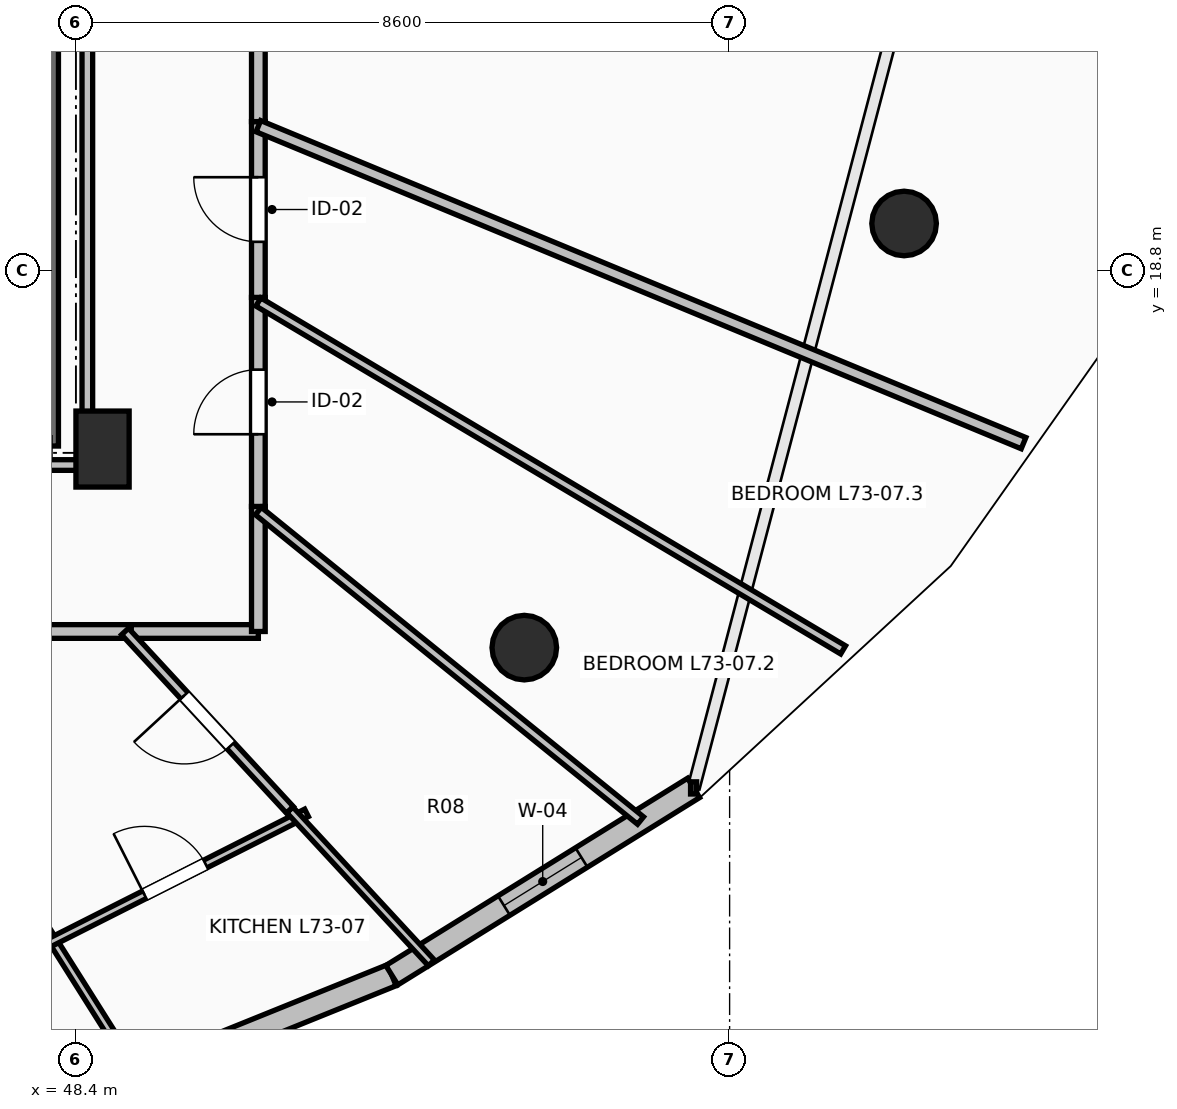
"""IFC4 building model, lengths in metres.
Left out: names, types, materials, properties, quantities, classifications, styles, units other than length and angle.
Written with IfcOpenShell. Run it as: python <this file> out.ifc"""

import sys

from ifc_helpers import new_model, si_unit, direction, frame, frame_2d, origin, origin_2d, place, context, subcontext, project, spatial, rectangle, circle, extrude, element, fill, save


model = new_model("IFC4")
c1 = context("Model", 3, precision=1e-05, world=origin(), true_north=direction((0.0, 1.0)))
c2 = subcontext(c1, "Body", "Model", "MODEL_VIEW")
j1 = project(units=[si_unit("LENGTHUNIT", "METRE"), si_unit("PLANEANGLEUNIT", "RADIAN")], contexts=[c1])
p1 = place(None, origin())
s1 = spatial("IfcSite", under=j1, at=p1, CompositionType="ELEMENT")
p2 = place(p1, origin())
s2 = spatial("IfcBuilding", under=s1, at=p2, CompositionType="ELEMENT")
p3 = place(p2, frame((0.0, 0.0, 269.75)))
s3 = spatial("IfcBuildingStorey", under=s2, at=p3, CompositionType="ELEMENT", Elevation=269.75)
for number, where, z_axis, x_axis in (
    (1, (54.299, 13.838, 0.0), (0.0, 0.0, 1.0), (0.707, -0.707, 0.0)),
    (2, (59.295, 19.418, 0.0), (0.0, 0.0, 1.0), (0.924, -0.383, 0.0)),
):
    element("IfcColumn", number, at=place(p3, frame(where, z_axis=z_axis, x_axis=x_axis)), inside=s3, PredefinedType="COLUMN", context=c2, shape_type="SweptSolid", body=[
        extrude(circle(Radius=0.425, at=origin_2d()), origin(), (0.0, 0.0, 1.0), 3.55),
    ])
p4 = place(p3, frame((48.75, 16.45, 0.0), z_axis=(0.0, 0.0, 1.0), x_axis=(1.0, 0.0, 0.0)))
e3 = element("IfcColumn", 3, at=p4, inside=s3, PredefinedType="PILASTER", context=c2, shape_type="SweptSolid", body=[
    extrude(rectangle(XDim=0.7, YDim=1.0, at=origin_2d()), origin(), (0.0, 0.0, 1.0), 3.55),
])
p5 = place(p3, frame((48.026, 7.698, 0.0), z_axis=(0.0, 0.0, 1.0), x_axis=(0.927147375511, 0.374696869594, 0.0)))
e4 = element("IfcWall", 4, at=p5, inside=s3, PredefinedType="STANDARD", context=c2, shape_type="SweptSolid", body=[
    extrude(rectangle(XDim=4.885, YDim=0.3, at=frame_2d((2.443, 0.0))), origin(), (0.0, 0.0, 1.0), 3.29),
])
p6 = place(p3, frame((52.556, 9.529, 0.0), z_axis=(0.0, 0.0, 1.0), x_axis=(0.849702323036, 0.527262707032, 0.0)))
e5 = element("IfcWall", 5, at=p6, inside=s3, PredefinedType="STANDARD", context=c2, shape_type="SweptSolid", body=[
    extrude(rectangle(XDim=4.672, YDim=0.3, at=frame_2d((2.336, 0.0))), origin(), (0.0, 0.0, 1.0), 3.29),
])
p7 = place(p6, frame((1.736, 0.0, 0.85)))
e6 = element("IfcOpeningElement", 6, at=p7, cuts=e5, PredefinedType="OPENING", context=c2, shape_type="SweptSolid", body=[
    extrude(rectangle(XDim=1.2, YDim=1.95, at=frame_2d((0.6, 0.975))), frame((0.0, 0.165, 0.0), z_axis=(0.0, -1.0, 0.0), x_axis=(1.0, 0.0, 0.0)), (0.0, 0.0, 1.0), 0.33),
])
p8 = place(p3, frame((48.06, 23.91, 0.0), z_axis=(0.0, 0.0, 1.0), x_axis=(0.0, -1.0, 0.0)))
e7 = element("IfcWall", 7, at=p8, inside=s3, PredefinedType="SOLIDWALL", context=c2, shape_type="SweptSolid", body=[
    extrude(rectangle(XDim=7.42, YDim=0.22, at=frame_2d((3.71, 0.0))), origin(), (0.0, 0.0, 1.0), 3.29),
])
p9 = place(p3, frame((45.237, 14.05, 0.0), z_axis=(0.0, 0.0, 1.0), x_axis=(1.0, 0.0, 0.0)))
e8 = element("IfcWall", 8, at=p9, inside=s3, PredefinedType="PARTITIONING", context=c2, shape_type="SweptSolid", body=[
    extrude(rectangle(XDim=3.891, YDim=0.18, at=frame_2d((1.945, 0.0))), origin(), (0.0, 0.0, 1.0), 2.482),
])
p10 = place(p9, frame((1.446, 0.0, 0.0)))
e9 = element("IfcOpeningElement", 9, at=p10, cuts=e8, PredefinedType="OPENING", context=c2, shape_type="SweptSolid", body=[
    extrude(rectangle(XDim=1.0, YDim=2.15, at=frame_2d((0.5, 1.075))), frame((0.0, 0.105, 0.0), z_axis=(0.0, -1.0, 0.0), x_axis=(1.0, 0.0, 0.0)), (0.0, 0.0, 1.0), 0.21),
])
p11 = place(p3, frame((49.128, 14.05, 0.0), z_axis=(0.0, 0.0, 1.0), x_axis=(1.0, 0.0, 0.0)))
e10 = element("IfcWall", 10, at=p11, inside=s3, PredefinedType="PARTITIONING", context=c2, shape_type="SweptSolid", body=[
    extrude(rectangle(XDim=1.672, YDim=0.18, at=frame_2d((0.836, 0.0))), origin(), (0.0, 0.0, 1.0), 2.936),
])
p12 = place(p3, frame((50.8, 14.05, 0.0), z_axis=(0.0, 0.0, 1.0), x_axis=(0.0, 1.0, 0.0)))
e11 = element("IfcWall", 11, at=p12, inside=s3, PredefinedType="PARTITIONING", context=c2, shape_type="SweptSolid", body=[
    extrude(rectangle(XDim=1.645, YDim=0.18, at=frame_2d((0.823, 0.0))), origin(), (0.0, 0.0, 1.0), 2.482),
])
p13 = place(p3, frame((50.8, 15.695, 0.0), z_axis=(0.0, 0.0, 1.0), x_axis=(0.0, 1.0, 0.0)))
e12 = element("IfcWall", 12, at=p13, inside=s3, PredefinedType="PARTITIONING", context=c2, shape_type="SweptSolid", body=[
    extrude(rectangle(XDim=2.75, YDim=0.18, at=frame_2d((1.375, 0.0))), origin(), (0.0, 0.0, 1.0), 2.482),
])
p14 = place(p13, frame((0.95, 0.0, 0.0)))
e13 = element("IfcOpeningElement", 13, at=p14, cuts=e12, PredefinedType="OPENING", context=c2, shape_type="SweptSolid", body=[
    extrude(rectangle(XDim=0.85, YDim=2.1, at=frame_2d((0.425, 1.05))), frame((0.0, 0.105, 0.0), z_axis=(0.0, -1.0, 0.0), x_axis=(1.0, 0.0, 0.0)), (0.0, 0.0, 1.0), 0.21),
])
p15 = place(p3, frame((50.8, 18.445, 0.0), z_axis=(0.0, 0.0, 1.0), x_axis=(0.0, 1.0, 0.0)))
e14 = element("IfcWall", 14, at=p15, inside=s3, PredefinedType="PARTITIONING", context=c2, shape_type="SweptSolid", body=[
    extrude(rectangle(XDim=2.313, YDim=0.18, at=frame_2d((1.156, 0.0))), origin(), (0.0, 0.0, 1.0), 3.29),
])
p16 = place(p15, frame((0.731, 0.0, 0.0)))
e15 = element("IfcOpeningElement", 15, at=p16, cuts=e14, PredefinedType="OPENING", context=c2, shape_type="SweptSolid", body=[
    extrude(rectangle(XDim=0.85, YDim=2.1, at=frame_2d((0.425, 1.05))), frame((0.0, 0.105, 0.0), z_axis=(0.0, -1.0, 0.0), x_axis=(1.0, 0.0, 0.0)), (0.0, 0.0, 1.0), 0.21),
])
p17 = place(p3, frame((50.8, 20.758, 0.0), z_axis=(0.0, 0.0, 1.0), x_axis=(0.0, 1.0, 0.0)))
e16 = element("IfcWall", 16, at=p17, inside=s3, PredefinedType="PARTITIONING", context=c2, shape_type="SweptSolid", body=[
    extrude(rectangle(XDim=10.344, YDim=0.18, at=frame_2d((5.172, 0.0))), origin(), (0.0, 0.0, 1.0), 2.482),
])
p18 = place(p17, frame((4.672, 0.0, 0.0)))
e17 = element("IfcOpeningElement", 17, at=p18, cuts=e16, PredefinedType="OPENING", context=c2, shape_type="SweptSolid", body=[
    extrude(rectangle(XDim=1.0, YDim=2.15, at=frame_2d((0.5, 1.075))), frame((0.0, 0.105, 0.0), z_axis=(0.0, -1.0, 0.0), x_axis=(1.0, 0.0, 0.0)), (0.0, 0.0, 1.0), 0.21),
])
p19 = place(p3, frame((49.303, 8.067, 0.0), z_axis=(0.0, 0.0, 1.0), x_axis=(-0.53356042882, 0.845761945702, 0.0)))
e18 = element("IfcWall", 18, at=p19, inside=s3, PredefinedType="PARTITIONING", context=c2, shape_type="SweptSolid", body=[
    extrude(rectangle(XDim=2.4, YDim=0.11, at=frame_2d((1.2, 0.0))), origin(), (0.0, 0.0, 1.0), 3.29),
])
p20 = place(p3, frame((47.972, 9.915, 0.0), z_axis=(0.0, 0.0, 1.0), x_axis=(0.892543730476, 0.450960851059, 0.0)))
e19 = element("IfcWall", 19, at=p20, inside=s3, PredefinedType="PARTITIONING", context=c2, shape_type="SweptSolid", body=[
    extrude(rectangle(XDim=3.879, YDim=0.11, at=frame_2d((1.939, 0.0))), origin(), (0.0, 0.0, 1.0), 3.29),
])
p21 = place(p20, frame((1.49, 0.0, 0.0)))
e20 = element("IfcOpeningElement", 20, at=p21, cuts=e19, PredefinedType="OPENING", context=c2, shape_type="SweptSolid", body=[
    extrude(rectangle(XDim=0.9, YDim=2.1, at=frame_2d((0.45, 1.05))), frame((0.0, 0.07, 0.0), z_axis=(0.0, -1.0, 0.0), x_axis=(1.0, 0.0, 0.0)), (0.0, 0.0, 1.0), 0.14),
])
p22 = place(p3, frame((51.214, 11.704, 0.0), z_axis=(0.0, 0.0, 1.0), x_axis=(0.678974823397, -0.734161555241, 0.0)))
e21 = element("IfcWall", 21, at=p22, inside=s3, PredefinedType="PARTITIONING", context=c2, shape_type="SweptSolid", body=[
    extrude(rectangle(XDim=2.743, YDim=0.11, at=frame_2d((1.372, 0.0))), origin(), (0.0, 0.0, 1.0), 3.29),
])
p23 = place(p3, frame((51.214, 11.704, 0.0), z_axis=(0.0, 0.0, 1.0), x_axis=(-0.678781449794, 0.734340345763, 0.0)))
e22 = element("IfcWall", 22, at=p23, inside=s3, PredefinedType="PARTITIONING", context=c2, shape_type="SweptSolid", body=[
    extrude(rectangle(XDim=3.195, YDim=0.125, at=frame_2d((1.597, 0.0))), origin(), (0.0, 0.0, 1.0), 2.874),
])
p24 = place(p23, frame((1.147, 0.0, 0.0)))
e23 = element("IfcOpeningElement", 23, at=p24, cuts=e22, PredefinedType="OPENING", context=c2, shape_type="SweptSolid", body=[
    extrude(rectangle(XDim=0.9, YDim=2.1, at=frame_2d((0.45, 1.05))), frame((0.0, 0.077, 0.0), z_axis=(0.0, -1.0, 0.0), x_axis=(1.0, 0.0, 0.0)), (0.0, 0.0, 1.0), 0.155),
])
p25 = place(p3, frame((55.828, 11.563, 0.0), z_axis=(0.0, 0.0, 1.0), x_axis=(-0.777103372697, 0.62937298015, 0.0)))
e24 = element("IfcWall", 24, at=p25, inside=s3, PredefinedType="PARTITIONING", context=c2, shape_type="SweptSolid", body=[
    extrude(rectangle(XDim=6.47, YDim=0.125, at=frame_2d((3.235, 0.0))), origin(), (0.0, 0.0, 1.0), 2.482),
])
p26 = place(p3, frame((58.493, 13.808, 0.0), z_axis=(0.0, 0.0, 1.0), x_axis=(-0.859400180079, 0.511303560011, 0.0)))
e25 = element("IfcWall", 25, at=p26, inside=s3, PredefinedType="PARTITIONING", context=c2, shape_type="SweptSolid", body=[
    extrude(rectangle(XDim=8.951, YDim=0.125, at=frame_2d((4.476, 0.0))), origin(), (0.0, 0.0, 1.0), 2.874),
])
p27 = place(p3, frame((60.867, 16.528, 0.0), z_axis=(0.0, 0.0, 1.0), x_axis=(-0.923877013663, 0.382689513347, 0.0)))
e26 = element("IfcWall", 26, at=p27, inside=s3, PredefinedType="PARTITIONING", context=c2, shape_type="SweptSolid", body=[
    extrude(rectangle(XDim=10.896, YDim=0.16, at=frame_2d((5.448, 0.0))), origin(), (0.0, 0.0, 1.0), 2.874),
])
p28 = place(p3, frame((44.805, 16.24, 0.0), z_axis=(0.0, 0.0, 1.0), x_axis=(1.0, 0.0, 0.0)))
e27 = element("IfcWall", 27, at=p28, inside=s3, PredefinedType="PARTITIONING", context=c2, shape_type="SweptSolid", body=[
    extrude(rectangle(XDim=3.745, YDim=0.14, at=frame_2d((1.873, 0.0))), origin(), (0.0, 0.0, 1.0), 2.482),
])
p29 = place(p3, frame((48.55, 16.24, 0.0), z_axis=(0.0, 0.0, 1.0), x_axis=(0.0, 1.0, 0.0)))
e28 = element("IfcWall", 28, at=p29, inside=s3, PredefinedType="PARTITIONING", context=c2, shape_type="SweptSolid", body=[
    extrude(rectangle(XDim=7.514, YDim=0.14, at=frame_2d((3.757, 0.0))), origin(), (0.0, 0.0, 1.0), 2.482),
])
p30 = place(p7, origin())
e29 = element("IfcWindow", 29, at=p30, inside=s3, PartitioningType="SINGLE_PANEL", PredefinedType="WINDOW", context=c2, shape_type="SweptSolid", body=[
    extrude(rectangle(XDim=1.2, YDim=1.95, at=frame_2d((0.6, 0.975))), frame((0.0, 0.03, 0.0), z_axis=(0.0, -1.0, 0.0), x_axis=(1.0, 0.0, 0.0)), (0.0, 0.0, 1.0), 0.06),
])
fill(e6, e29)
p31 = place(p21, origin())
e30 = element("IfcDoor", 30, at=p31, inside=s3, OperationType="SINGLE_SWING_LEFT", PredefinedType="DOOR", context=c2, shape_type="SweptSolid", body=[
    extrude(rectangle(XDim=0.9, YDim=2.1, at=frame_2d((0.45, 1.05))), frame((0.0, 0.025, 0.0), z_axis=(0.0, -1.0, 0.0), x_axis=(1.0, 0.0, 0.0)), (0.0, 0.0, 1.0), 0.05),
])
fill(e20, e30)
p32 = place(p24, origin())
e31 = element("IfcDoor", 31, at=p32, inside=s3, OperationType="SINGLE_SWING_RIGHT", PredefinedType="DOOR", context=c2, shape_type="SweptSolid", body=[
    extrude(rectangle(XDim=0.9, YDim=2.1, at=frame_2d((0.45, 1.05))), frame((0.0, 0.025, 0.0), z_axis=(0.0, -1.0, 0.0), x_axis=(1.0, 0.0, 0.0)), (0.0, 0.0, 1.0), 0.05),
])
fill(e23, e31)
p33 = place(p14, origin())
e32 = element("IfcDoor", 32, at=p33, inside=s3, OperationType="SINGLE_SWING_LEFT", PredefinedType="DOOR", context=c2, shape_type="SweptSolid", body=[
    extrude(rectangle(XDim=0.85, YDim=2.1, at=frame_2d((0.425, 1.05))), frame((0.0, 0.025, 0.0), z_axis=(0.0, -1.0, 0.0), x_axis=(1.0, 0.0, 0.0)), (0.0, 0.0, 1.0), 0.05),
])
fill(e13, e32)
p34 = place(p16, origin())
e33 = element("IfcDoor", 33, at=p34, inside=s3, OperationType="SINGLE_SWING_RIGHT", PredefinedType="DOOR", context=c2, shape_type="SweptSolid", body=[
    extrude(rectangle(XDim=0.85, YDim=2.1, at=frame_2d((0.425, 1.05))), frame((0.0, 0.025, 0.0), z_axis=(0.0, -1.0, 0.0), x_axis=(1.0, 0.0, 0.0)), (0.0, 0.0, 1.0), 0.05),
])
fill(e15, e33)
save(model, sys.argv[1])
